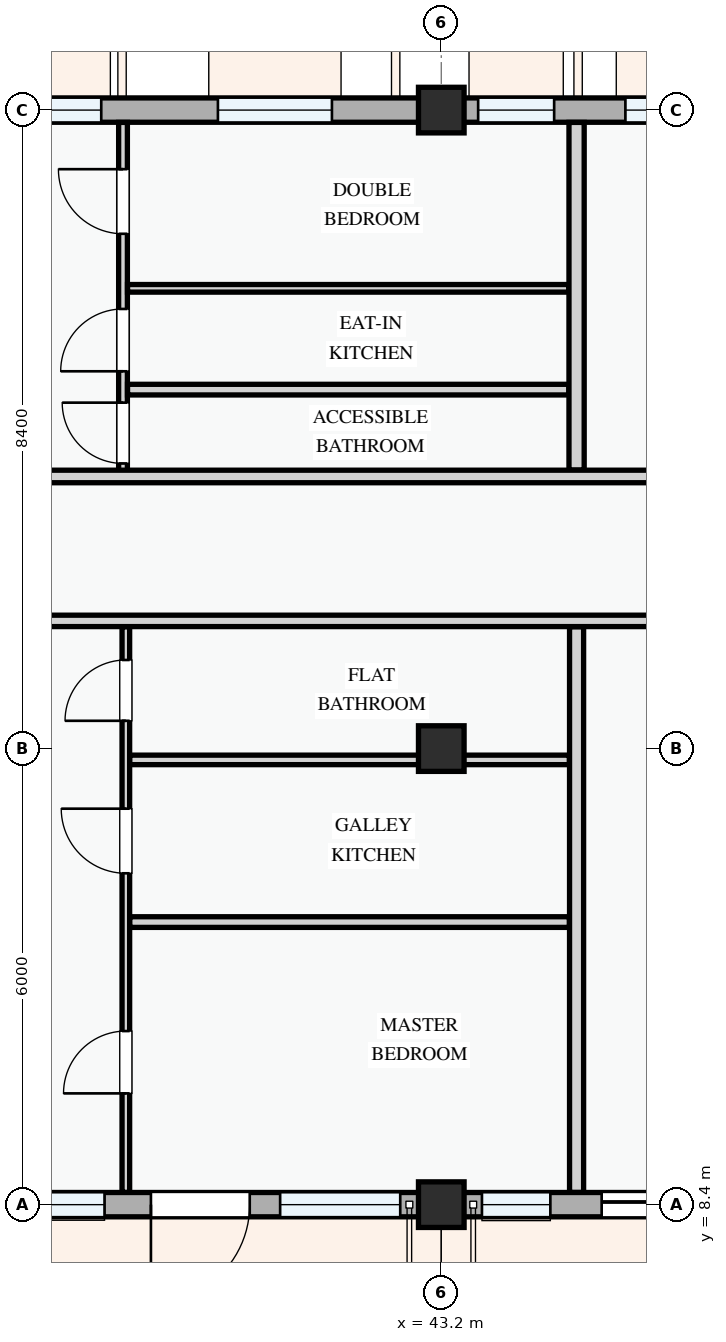
"""IFC4 building model, lengths in metres.
Left out: names, types, materials, properties, quantities, classifications, styles, units other than length and angle.
Written with IfcOpenShell. Run it as: python <this file> out.ifc"""

import sys

from ifc_helpers import new_model, si_unit, direction, frame, frame_2d, origin, origin_2d, place, context, subcontext, project, spatial, rectangle, extrude, element, fill, save


model = new_model("IFC4")
c1 = context("Model", 3, precision=1e-05, world=origin(), true_north=direction((0.0, 1.0)))
c2 = subcontext(c1, "Body", "Model", "MODEL_VIEW")
j1 = project(units=[si_unit("LENGTHUNIT", "METRE"), si_unit("PLANEANGLEUNIT", "RADIAN")], contexts=[c1])
p1 = place(None, origin())
s1 = spatial("IfcSite", under=j1, at=p1, CompositionType="ELEMENT")
p2 = place(p1, origin())
s2 = spatial("IfcBuilding", under=s1, at=p2, CompositionType="ELEMENT")
p3 = place(p2, frame((0.0, 0.0, 14.7)))
s3 = spatial("IfcBuildingStorey", under=s2, at=p3, CompositionType="ELEMENT", Elevation=14.7)
for number, where, z_axis, x_axis in (
    (1, (43.2, 8.4, 0.0), (0.0, 0.0, 1.0), (1.0, 0.0, 0.0)),
    (2, (43.2, 14.4, 0.0), (0.0, 0.0, 1.0), (1.0, 0.0, 0.0)),
    (3, (43.2, 22.8, 0.0), (0.0, 0.0, 1.0), (1.0, 0.0, 0.0)),
):
    element("IfcColumn", number, at=place(p3, frame(where, z_axis=z_axis, x_axis=x_axis)), inside=s3, PredefinedType="COLUMN", context=c2, shape_type="SweptSolid", body=[
        extrude(rectangle(XDim=0.6, YDim=0.6, at=origin_2d()), origin(), (0.0, 0.0, 1.0), 3.3),
    ])
p4 = place(p3, frame((37.2, 8.4, 0.0), z_axis=(0.0, 0.0, 1.0), x_axis=(1.0, 0.0, 0.0)))
e4 = element("IfcWall", 4, at=p4, inside=s3, PredefinedType="STANDARD", context=c2, shape_type="SweptSolid", body=[
    extrude(rectangle(XDim=6.0, YDim=0.32, at=frame_2d((3.0, 0.0))), origin(), (0.0, 0.0, 1.0), 2.475),
])
p5 = place(p4, frame((2.18, 0.0, 0.0)))
e5 = element("IfcOpeningElement", 5, at=p5, cuts=e4, PredefinedType="OPENING", context=c2, shape_type="SweptSolid", body=[
    extrude(rectangle(XDim=1.3, YDim=2.15, at=frame_2d((0.65, 1.075))), frame((0.0, 0.17, 0.0), z_axis=(0.0, -1.0, 0.0), x_axis=(1.0, 0.0, 0.0)), (0.0, 0.0, 1.0), 0.34),
])
p6 = place(p4, frame((0.47, 0.0, 0.78)))
e6 = element("IfcOpeningElement", 6, at=p6, cuts=e4, PredefinedType="OPENING", context=c2, shape_type="SweptSolid", body=[
    extrude(rectangle(XDim=1.1, YDim=1.3, at=frame_2d((0.55, 0.65))), frame((0.0, 0.17, 0.0), z_axis=(0.0, -1.0, 0.0), x_axis=(1.0, 0.0, 0.0)), (0.0, 0.0, 1.0), 0.34),
])
p7 = place(p4, frame((3.88, 0.0, 0.78)))
e7 = element("IfcOpeningElement", 7, at=p7, cuts=e4, PredefinedType="OPENING", context=c2, shape_type="SweptSolid", body=[
    extrude(rectangle(XDim=1.58, YDim=1.48, at=frame_2d((0.79, 0.74))), frame((0.0, 0.17, 0.0), z_axis=(0.0, -1.0, 0.0), x_axis=(1.0, 0.0, 0.0)), (0.0, 0.0, 1.0), 0.34),
])
p8 = place(p3, frame((43.2, 8.4, 0.0), z_axis=(0.0, 0.0, 1.0), x_axis=(1.0, 0.0, 0.0)))
e8 = element("IfcWall", 8, at=p8, inside=s3, PredefinedType="STANDARD", context=c2, shape_type="SweptSolid", body=[
    extrude(rectangle(XDim=8.4, YDim=0.32, at=frame_2d((4.2, 0.0))), origin(), (0.0, 0.0, 1.0), 2.375),
])
p9 = place(p8, frame((2.11, 0.0, 0.0)))
e9 = element("IfcOpeningElement", 9, at=p9, cuts=e8, PredefinedType="OPENING", context=c2, shape_type="SweptSolid", body=[
    extrude(rectangle(XDim=1.4, YDim=2.2, at=frame_2d((0.7, 1.1))), frame((0.0, 0.17, 0.0), z_axis=(0.0, -1.0, 0.0), x_axis=(1.0, 0.0, 0.0)), (0.0, 0.0, 1.0), 0.34),
])
p10 = place(p8, frame((0.535, 0.0, 0.78)))
e10 = element("IfcOpeningElement", 10, at=p10, cuts=e8, PredefinedType="OPENING", context=c2, shape_type="SweptSolid", body=[
    extrude(rectangle(XDim=0.9, YDim=1.2, at=frame_2d((0.45, 0.6))), frame((0.0, 0.17, 0.0), z_axis=(0.0, -1.0, 0.0), x_axis=(1.0, 0.0, 0.0)), (0.0, 0.0, 1.0), 0.34),
])
p11 = place(p8, frame((4.56, 0.0, 0.78)))
e11 = element("IfcOpeningElement", 11, at=p11, cuts=e8, PredefinedType="OPENING", context=c2, shape_type="SweptSolid", body=[
    extrude(rectangle(XDim=1.1, YDim=1.3, at=frame_2d((0.55, 0.65))), frame((0.0, 0.17, 0.0), z_axis=(0.0, -1.0, 0.0), x_axis=(1.0, 0.0, 0.0)), (0.0, 0.0, 1.0), 0.34),
])
p12 = place(p8, frame((6.96, 0.0, 0.78)))
e12 = element("IfcOpeningElement", 12, at=p12, cuts=e8, PredefinedType="OPENING", context=c2, shape_type="SweptSolid", body=[
    extrude(rectangle(XDim=0.95, YDim=1.15, at=frame_2d((0.475, 0.575))), frame((0.0, 0.17, 0.0), z_axis=(0.0, -1.0, 0.0), x_axis=(1.0, 0.0, 0.0)), (0.0, 0.0, 1.0), 0.34),
])
p13 = place(p3, frame((51.6, 22.8, 0.0), z_axis=(0.0, 0.0, 1.0), x_axis=(-1.0, 0.0, 0.0)))
e13 = element("IfcWall", 13, at=p13, inside=s3, PredefinedType="STANDARD", context=c2, shape_type="SweptSolid", body=[
    extrude(rectangle(XDim=8.4, YDim=0.32, at=frame_2d((4.2, 0.0))), origin(), (0.0, 0.0, 1.0), 2.375),
])
p14 = place(p13, frame((0.541, 0.0, 0.78)))
e14 = element("IfcOpeningElement", 14, at=p14, cuts=e13, PredefinedType="OPENING", context=c2, shape_type="SweptSolid", body=[
    extrude(rectangle(XDim=0.9, YDim=1.2, at=frame_2d((0.45, 0.6))), frame((0.0, 0.17, 0.0), z_axis=(0.0, -1.0, 0.0), x_axis=(1.0, 0.0, 0.0)), (0.0, 0.0, 1.0), 0.34),
])
p15 = place(p13, frame((2.193, 0.0, 0.78)))
e15 = element("IfcOpeningElement", 15, at=p15, cuts=e13, PredefinedType="OPENING", context=c2, shape_type="SweptSolid", body=[
    extrude(rectangle(XDim=1.68, YDim=1.46, at=frame_2d((0.84, 0.73))), frame((0.0, 0.17, 0.0), z_axis=(0.0, -1.0, 0.0), x_axis=(1.0, 0.0, 0.0)), (0.0, 0.0, 1.0), 0.34),
])
p16 = place(p13, frame((4.778, 0.0, 0.78)))
e16 = element("IfcOpeningElement", 16, at=p16, cuts=e13, PredefinedType="OPENING", context=c2, shape_type="SweptSolid", body=[
    extrude(rectangle(XDim=1.2, YDim=1.35, at=frame_2d((0.6, 0.675))), frame((0.0, 0.17, 0.0), z_axis=(0.0, -1.0, 0.0), x_axis=(1.0, 0.0, 0.0)), (0.0, 0.0, 1.0), 0.34),
])
p17 = place(p13, frame((6.915, 0.0, 0.78)))
e17 = element("IfcOpeningElement", 17, at=p17, cuts=e13, PredefinedType="OPENING", context=c2, shape_type="SweptSolid", body=[
    extrude(rectangle(XDim=1.0, YDim=1.25, at=frame_2d((0.5, 0.625))), frame((0.0, 0.17, 0.0), z_axis=(0.0, -1.0, 0.0), x_axis=(1.0, 0.0, 0.0)), (0.0, 0.0, 1.0), 0.34),
])
p18 = place(p3, frame((43.2, 22.8, 0.0), z_axis=(0.0, 0.0, 1.0), x_axis=(-1.0, 0.0, 0.0)))
e18 = element("IfcWall", 18, at=p18, inside=s3, PredefinedType="STANDARD", context=c2, shape_type="SweptSolid", body=[
    extrude(rectangle(XDim=6.0, YDim=0.32, at=frame_2d((3.0, 0.0))), origin(), (0.0, 0.0, 1.0), 2.475),
])
p19 = place(p18, frame((1.439, 0.0, 0.78)))
e19 = element("IfcOpeningElement", 19, at=p19, cuts=e18, PredefinedType="OPENING", context=c2, shape_type="SweptSolid", body=[
    extrude(rectangle(XDim=1.5, YDim=1.5, at=frame_2d((0.75, 0.75))), frame((0.0, 0.17, 0.0), z_axis=(0.0, -1.0, 0.0), x_axis=(1.0, 0.0, 0.0)), (0.0, 0.0, 1.0), 0.34),
])
p20 = place(p18, frame((4.474, 0.0, 0.78)))
e20 = element("IfcOpeningElement", 20, at=p20, cuts=e18, PredefinedType="OPENING", context=c2, shape_type="SweptSolid", body=[
    extrude(rectangle(XDim=1.05, YDim=1.2, at=frame_2d((0.525, 0.6))), frame((0.0, 0.17, 0.0), z_axis=(0.0, -1.0, 0.0), x_axis=(1.0, 0.0, 0.0)), (0.0, 0.0, 1.0), 0.34),
])
p21 = place(p3, frame((39.05, 8.562, 0.0), z_axis=(0.0, 0.0, 1.0), x_axis=(0.0, 1.0, 0.0)))
e21 = element("IfcWall", 21, at=p21, inside=s3, PredefinedType="PARTITIONING", context=c2, shape_type="SweptSolid", body=[
    extrude(rectangle(XDim=7.441, YDim=0.1, at=frame_2d((3.72, 0.0))), origin(), (0.0, 0.0, 1.0), 3.0),
])
p22 = place(p21, frame((1.302, 0.0, 0.0)))
e22 = element("IfcOpeningElement", 22, at=p22, cuts=e21, PredefinedType="OPENING", context=c2, shape_type="SweptSolid", body=[
    extrude(rectangle(XDim=0.82, YDim=2.08, at=frame_2d((0.41, 1.04))), frame((0.0, 0.06, 0.0), z_axis=(0.0, -1.0, 0.0), x_axis=(1.0, 0.0, 0.0)), (0.0, 0.0, 1.0), 0.12),
])
p23 = place(p21, frame((4.198, 0.0, 0.0)))
e23 = element("IfcOpeningElement", 23, at=p23, cuts=e21, PredefinedType="OPENING", context=c2, shape_type="SweptSolid", body=[
    extrude(rectangle(XDim=0.85, YDim=2.1, at=frame_2d((0.425, 1.05))), frame((0.0, 0.06, 0.0), z_axis=(0.0, -1.0, 0.0), x_axis=(1.0, 0.0, 0.0)), (0.0, 0.0, 1.0), 0.12),
])
p24 = place(p21, frame((6.204, 0.0, 0.0)))
e24 = element("IfcOpeningElement", 24, at=p24, cuts=e21, PredefinedType="OPENING", context=c2, shape_type="SweptSolid", body=[
    extrude(rectangle(XDim=0.8, YDim=2.1, at=frame_2d((0.4, 1.05))), frame((0.0, 0.06, 0.0), z_axis=(0.0, -1.0, 0.0), x_axis=(1.0, 0.0, 0.0)), (0.0, 0.0, 1.0), 0.12),
])
p25 = place(p3, frame((39.102, 12.118, 0.0), z_axis=(0.0, 0.0, 1.0), x_axis=(1.0, 0.0, 0.0)))
e25 = element("IfcWall", 25, at=p25, inside=s3, PredefinedType="PARTITIONING", context=c2, shape_type="SweptSolid", body=[
    extrude(rectangle(XDim=5.783, YDim=0.14, at=frame_2d((2.892, 0.0))), origin(), (0.0, 0.0, 1.0), 3.0),
])
p26 = place(p3, frame((39.102, 14.251, 0.0), z_axis=(0.0, 0.0, 1.0), x_axis=(1.0, 0.0, 0.0)))
e26 = element("IfcWall", 26, at=p26, inside=s3, PredefinedType="PARTITIONING", context=c2, shape_type="SweptSolid", body=[
    extrude(rectangle(XDim=5.783, YDim=0.125, at=frame_2d((2.892, 0.0))), origin(), (0.0, 0.0, 1.0), 2.375),
])
p27 = place(p3, frame((39.013, 17.98, 0.0), z_axis=(0.0, 0.0, 1.0), x_axis=(0.0, 1.0, 0.0)))
e27 = element("IfcWall", 27, at=p27, inside=s3, PredefinedType="PARTITIONING", context=c2, shape_type="SweptSolid", body=[
    extrude(rectangle(XDim=4.658, YDim=0.115, at=frame_2d((2.329, 0.0))), origin(), (0.0, 0.0, 1.0), 3.0),
])
p28 = place(p27, frame((0.171, 0.0, 0.0)))
e28 = element("IfcOpeningElement", 28, at=p28, cuts=e27, PredefinedType="OPENING", context=c2, shape_type="SweptSolid", body=[
    extrude(rectangle(XDim=0.8, YDim=2.1, at=frame_2d((0.4, 1.05))), frame((0.0, 0.067, 0.0), z_axis=(0.0, -1.0, 0.0), x_axis=(1.0, 0.0, 0.0)), (0.0, 0.0, 1.0), 0.135),
])
p29 = place(p27, frame((1.384, 0.0, 0.0)))
e29 = element("IfcOpeningElement", 29, at=p29, cuts=e27, PredefinedType="OPENING", context=c2, shape_type="SweptSolid", body=[
    extrude(rectangle(XDim=0.82, YDim=2.08, at=frame_2d((0.41, 1.04))), frame((0.0, 0.067, 0.0), z_axis=(0.0, -1.0, 0.0), x_axis=(1.0, 0.0, 0.0)), (0.0, 0.0, 1.0), 0.135),
])
p30 = place(p27, frame((3.193, 0.0, 0.0)))
e30 = element("IfcOpeningElement", 30, at=p30, cuts=e27, PredefinedType="OPENING", context=c2, shape_type="SweptSolid", body=[
    extrude(rectangle(XDim=0.85, YDim=2.1, at=frame_2d((0.425, 1.05))), frame((0.0, 0.067, 0.0), z_axis=(0.0, -1.0, 0.0), x_axis=(1.0, 0.0, 0.0)), (0.0, 0.0, 1.0), 0.135),
])
p31 = place(p3, frame((39.072, 20.455, 0.0), z_axis=(0.0, 0.0, 1.0), x_axis=(1.0, 0.0, 0.0)))
e31 = element("IfcWall", 31, at=p31, inside=s3, PredefinedType="PARTITIONING", context=c2, shape_type="SweptSolid", body=[
    extrude(rectangle(XDim=5.806, YDim=0.1, at=frame_2d((2.903, 0.0))), origin(), (0.0, 0.0, 1.0), 3.0),
])
p32 = place(p3, frame((39.072, 19.122, 0.0), z_axis=(0.0, 0.0, 1.0), x_axis=(1.0, 0.0, 0.0)))
e32 = element("IfcWall", 32, at=p32, inside=s3, PredefinedType="PARTITIONING", context=c2, shape_type="SweptSolid", body=[
    extrude(rectangle(XDim=5.806, YDim=0.14, at=frame_2d((2.903, 0.0))), origin(), (0.0, 0.0, 1.0), 3.0),
])
p33 = place(p3, frame((44.98, 8.562, 0.0), z_axis=(0.0, 0.0, 1.0), x_axis=(0.0, 1.0, 0.0)))
e33 = element("IfcWall", 33, at=p33, inside=s3, PredefinedType="PARTITIONING", context=c2, shape_type="SweptSolid", body=[
    extrude(rectangle(XDim=7.441, YDim=0.185, at=frame_2d((3.72, 0.0))), origin(), (0.0, 0.0, 1.0), 3.0),
])
p34 = place(p3, frame((44.98, 18.064, 0.0), z_axis=(0.0, 0.0, 1.0), x_axis=(0.0, 1.0, 0.0)))
e34 = element("IfcWall", 34, at=p34, inside=s3, PredefinedType="PARTITIONING", context=c2, shape_type="SweptSolid", body=[
    extrude(rectangle(XDim=4.573, YDim=0.2, at=frame_2d((2.287, 0.0))), origin(), (0.0, 0.0, 1.0), 3.0),
])
p35 = place(p3, frame((22.66, 16.08, 0.0), z_axis=(0.0, 0.0, 1.0), x_axis=(1.0, 0.0, 0.0)))
e35 = element("IfcWall", 35, at=p35, inside=s3, PredefinedType="PARTITIONING", context=c2, shape_type="SweptSolid", body=[
    extrude(rectangle(XDim=34.778, YDim=0.15, at=frame_2d((17.389, 0.0))), origin(), (0.0, 0.0, 1.0), 3.0),
])
p36 = place(p35, frame((2.672, 0.0, 0.0)))
e36 = element("IfcOpeningElement", 36, at=p36, cuts=e35, PredefinedType="OPENING", context=c2, shape_type="SweptSolid", body=[
    extrude(rectangle(XDim=0.96, YDim=2.12, at=frame_2d((0.48, 1.06))), frame((0.0, 0.085, 0.0), z_axis=(0.0, -1.0, 0.0), x_axis=(1.0, 0.0, 0.0)), (0.0, 0.0, 1.0), 0.17),
])
p37 = place(p35, frame((10.71, 0.0, 0.0)))
e37 = element("IfcOpeningElement", 37, at=p37, cuts=e35, PredefinedType="OPENING", context=c2, shape_type="SweptSolid", body=[
    extrude(rectangle(XDim=0.92, YDim=2.1, at=frame_2d((0.46, 1.05))), frame((0.0, 0.085, 0.0), z_axis=(0.0, -1.0, 0.0), x_axis=(1.0, 0.0, 0.0)), (0.0, 0.0, 1.0), 0.17),
])
p38 = place(p35, frame((24.28, 0.0, 0.0)))
e38 = element("IfcOpeningElement", 38, at=p38, cuts=e35, PredefinedType="OPENING", context=c2, shape_type="SweptSolid", body=[
    extrude(rectangle(XDim=0.92, YDim=2.1, at=frame_2d((0.46, 1.05))), frame((0.0, 0.085, 0.0), z_axis=(0.0, -1.0, 0.0), x_axis=(1.0, 0.0, 0.0)), (0.0, 0.0, 1.0), 0.17),
])
p39 = place(p3, frame((22.66, 17.98, 0.0), z_axis=(0.0, 0.0, 1.0), x_axis=(1.0, 0.0, 0.0)))
e39 = element("IfcWall", 39, at=p39, inside=s3, PredefinedType="PARTITIONING", context=c2, shape_type="SweptSolid", body=[
    extrude(rectangle(XDim=34.778, YDim=0.165, at=frame_2d((17.389, 0.0))), origin(), (0.0, 0.0, 1.0), 3.0),
])
p40 = place(p39, frame((2.664, 0.0, 0.0)))
e40 = element("IfcOpeningElement", 40, at=p40, cuts=e39, PredefinedType="OPENING", context=c2, shape_type="SweptSolid", body=[
    extrude(rectangle(XDim=0.92, YDim=2.1, at=frame_2d((0.46, 1.05))), frame((0.0, 0.093, 0.0), z_axis=(0.0, -1.0, 0.0), x_axis=(1.0, 0.0, 0.0)), (0.0, 0.0, 1.0), 0.185),
])
p41 = place(p39, frame((10.71, 0.0, 0.0)))
e41 = element("IfcOpeningElement", 41, at=p41, cuts=e39, PredefinedType="OPENING", context=c2, shape_type="SweptSolid", body=[
    extrude(rectangle(XDim=0.92, YDim=2.1, at=frame_2d((0.46, 1.05))), frame((0.0, 0.093, 0.0), z_axis=(0.0, -1.0, 0.0), x_axis=(1.0, 0.0, 0.0)), (0.0, 0.0, 1.0), 0.185),
])
p42 = place(p39, frame((24.254, 0.0, 0.0)))
e42 = element("IfcOpeningElement", 42, at=p42, cuts=e39, PredefinedType="OPENING", context=c2, shape_type="SweptSolid", body=[
    extrude(rectangle(XDim=0.96, YDim=2.12, at=frame_2d((0.48, 1.06))), frame((0.0, 0.093, 0.0), z_axis=(0.0, -1.0, 0.0), x_axis=(1.0, 0.0, 0.0)), (0.0, 0.0, 1.0), 0.185),
])
p43 = place(p5, frame((1.3, 0.0, 0.0), z_axis=(0.0, 0.0, 1.0), x_axis=(-1.0, 0.0, 0.0)))
e43 = element("IfcDoor", 43, at=p43, inside=s3, OperationType="SINGLE_SWING_RIGHT", PredefinedType="DOOR", context=c2, shape_type="SweptSolid", body=[
    extrude(rectangle(XDim=1.3, YDim=2.15, at=frame_2d((0.65, 1.075))), frame((0.0, 0.025, 0.0), z_axis=(0.0, -1.0, 0.0), x_axis=(1.0, 0.0, 0.0)), (0.0, 0.0, 1.0), 0.05),
])
fill(e5, e43)
p44 = place(p6, origin())
e44 = element("IfcWindow", 44, at=p44, inside=s3, PartitioningType="SINGLE_PANEL", PredefinedType="WINDOW", context=c2, shape_type="SweptSolid", body=[
    extrude(rectangle(XDim=1.1, YDim=1.3, at=frame_2d((0.55, 0.65))), frame((0.0, 0.03, 0.0), z_axis=(0.0, -1.0, 0.0), x_axis=(1.0, 0.0, 0.0)), (0.0, 0.0, 1.0), 0.06),
])
fill(e6, e44)
p45 = place(p7, origin())
e45 = element("IfcWindow", 45, at=p45, inside=s3, PartitioningType="SINGLE_PANEL", PredefinedType="WINDOW", context=c2, shape_type="SweptSolid", body=[
    extrude(rectangle(XDim=1.58, YDim=1.48, at=frame_2d((0.79, 0.74))), frame((0.0, 0.03, 0.0), z_axis=(0.0, -1.0, 0.0), x_axis=(1.0, 0.0, 0.0)), (0.0, 0.0, 1.0), 0.06),
])
fill(e7, e45)
p46 = place(p9, frame((1.4, 0.0, 0.0), z_axis=(0.0, 0.0, 1.0), x_axis=(-1.0, 0.0, 0.0)))
e46 = element("IfcDoor", 46, at=p46, inside=s3, OperationType="SLIDING_TO_LEFT", PredefinedType="DOOR", context=c2, shape_type="SweptSolid", body=[
    extrude(rectangle(XDim=1.4, YDim=2.2, at=frame_2d((0.7, 1.1))), frame((0.0, 0.025, 0.0), z_axis=(0.0, -1.0, 0.0), x_axis=(1.0, 0.0, 0.0)), (0.0, 0.0, 1.0), 0.05),
])
fill(e9, e46)
p47 = place(p10, origin())
e47 = element("IfcWindow", 47, at=p47, inside=s3, PartitioningType="SINGLE_PANEL", PredefinedType="WINDOW", context=c2, shape_type="SweptSolid", body=[
    extrude(rectangle(XDim=0.9, YDim=1.2, at=frame_2d((0.45, 0.6))), frame((0.0, 0.03, 0.0), z_axis=(0.0, -1.0, 0.0), x_axis=(1.0, 0.0, 0.0)), (0.0, 0.0, 1.0), 0.06),
])
fill(e10, e47)
p48 = place(p16, origin())
e48 = element("IfcWindow", 48, at=p48, inside=s3, PartitioningType="SINGLE_PANEL", PredefinedType="WINDOW", context=c2, shape_type="SweptSolid", body=[
    extrude(rectangle(XDim=1.2, YDim=1.35, at=frame_2d((0.6, 0.675))), frame((0.0, 0.03, 0.0), z_axis=(0.0, -1.0, 0.0), x_axis=(1.0, 0.0, 0.0)), (0.0, 0.0, 1.0), 0.06),
])
fill(e16, e48)
p49 = place(p17, origin())
e49 = element("IfcWindow", 49, at=p49, inside=s3, PartitioningType="SINGLE_PANEL", PredefinedType="WINDOW", context=c2, shape_type="SweptSolid", body=[
    extrude(rectangle(XDim=1.0, YDim=1.25, at=frame_2d((0.5, 0.625))), frame((0.0, 0.03, 0.0), z_axis=(0.0, -1.0, 0.0), x_axis=(1.0, 0.0, 0.0)), (0.0, 0.0, 1.0), 0.06),
])
fill(e17, e49)
p50 = place(p19, origin())
e50 = element("IfcWindow", 50, at=p50, inside=s3, PartitioningType="SINGLE_PANEL", PredefinedType="WINDOW", context=c2, shape_type="SweptSolid", body=[
    extrude(rectangle(XDim=1.5, YDim=1.5, at=frame_2d((0.75, 0.75))), frame((0.0, 0.03, 0.0), z_axis=(0.0, -1.0, 0.0), x_axis=(1.0, 0.0, 0.0)), (0.0, 0.0, 1.0), 0.06),
])
fill(e19, e50)
p51 = place(p20, origin())
e51 = element("IfcWindow", 51, at=p51, inside=s3, PartitioningType="SINGLE_PANEL", PredefinedType="WINDOW", context=c2, shape_type="SweptSolid", body=[
    extrude(rectangle(XDim=1.05, YDim=1.2, at=frame_2d((0.525, 0.6))), frame((0.0, 0.03, 0.0), z_axis=(0.0, -1.0, 0.0), x_axis=(1.0, 0.0, 0.0)), (0.0, 0.0, 1.0), 0.06),
])
fill(e20, e51)
p52 = place(p22, origin())
e52 = element("IfcDoor", 52, at=p52, inside=s3, OperationType="SINGLE_SWING_LEFT", PredefinedType="DOOR", context=c2, shape_type="SweptSolid", body=[
    extrude(rectangle(XDim=0.82, YDim=2.08, at=frame_2d((0.41, 1.04))), frame((0.0, 0.025, 0.0), z_axis=(0.0, -1.0, 0.0), x_axis=(1.0, 0.0, 0.0)), (0.0, 0.0, 1.0), 0.05),
])
fill(e22, e52)
p53 = place(p23, origin())
e53 = element("IfcDoor", 53, at=p53, inside=s3, OperationType="SINGLE_SWING_RIGHT", PredefinedType="DOOR", context=c2, shape_type="SweptSolid", body=[
    extrude(rectangle(XDim=0.85, YDim=2.1, at=frame_2d((0.425, 1.05))), frame((0.0, 0.025, 0.0), z_axis=(0.0, -1.0, 0.0), x_axis=(1.0, 0.0, 0.0)), (0.0, 0.0, 1.0), 0.05),
])
fill(e23, e53)
p54 = place(p24, origin())
e54 = element("IfcDoor", 54, at=p54, inside=s3, OperationType="SINGLE_SWING_LEFT", PredefinedType="DOOR", context=c2, shape_type="SweptSolid", body=[
    extrude(rectangle(XDim=0.8, YDim=2.1, at=frame_2d((0.4, 1.05))), frame((0.0, 0.025, 0.0), z_axis=(0.0, -1.0, 0.0), x_axis=(1.0, 0.0, 0.0)), (0.0, 0.0, 1.0), 0.05),
])
fill(e24, e54)
p55 = place(p28, origin())
e55 = element("IfcDoor", 55, at=p55, inside=s3, OperationType="SINGLE_SWING_RIGHT", PredefinedType="DOOR", context=c2, shape_type="SweptSolid", body=[
    extrude(rectangle(XDim=0.8, YDim=2.1, at=frame_2d((0.4, 1.05))), frame((0.0, 0.025, 0.0), z_axis=(0.0, -1.0, 0.0), x_axis=(1.0, 0.0, 0.0)), (0.0, 0.0, 1.0), 0.05),
])
fill(e28, e55)
p56 = place(p29, origin())
e56 = element("IfcDoor", 56, at=p56, inside=s3, OperationType="SINGLE_SWING_LEFT", PredefinedType="DOOR", context=c2, shape_type="SweptSolid", body=[
    extrude(rectangle(XDim=0.82, YDim=2.08, at=frame_2d((0.41, 1.04))), frame((0.0, 0.025, 0.0), z_axis=(0.0, -1.0, 0.0), x_axis=(1.0, 0.0, 0.0)), (0.0, 0.0, 1.0), 0.05),
])
fill(e29, e56)
p57 = place(p30, origin())
e57 = element("IfcDoor", 57, at=p57, inside=s3, OperationType="SINGLE_SWING_RIGHT", PredefinedType="DOOR", context=c2, shape_type="SweptSolid", body=[
    extrude(rectangle(XDim=0.85, YDim=2.1, at=frame_2d((0.425, 1.05))), frame((0.0, 0.025, 0.0), z_axis=(0.0, -1.0, 0.0), x_axis=(1.0, 0.0, 0.0)), (0.0, 0.0, 1.0), 0.05),
])
fill(e30, e57)
save(model, sys.argv[1])
